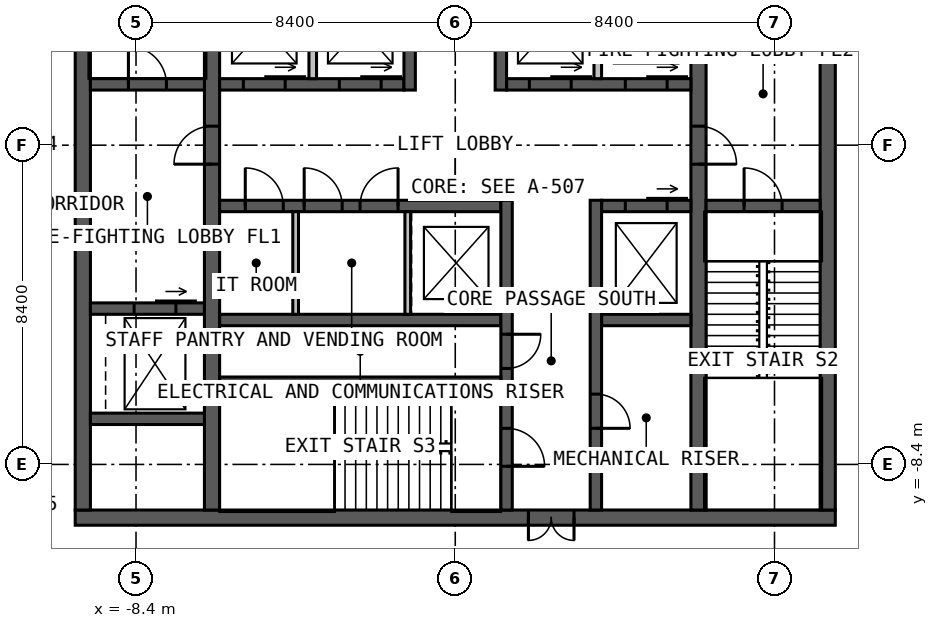
"""IFC4 building model, lengths in metres.
Left out: names, types, materials, properties, quantities, classifications, styles, units other than length and angle.
Written with IfcOpenShell. Run it as: python <this file> out.ifc"""

import sys

from ifc_helpers import new_model, si_unit, direction, frame, frame_2d, origin, place, context, subcontext, project, spatial, rectangle, extrude, element, fill, save


model = new_model("IFC4")
c1 = context("Model", 3, precision=1e-05, world=origin(), true_north=direction((0.0, 1.0)))
c2 = subcontext(c1, "Body", "Model", "MODEL_VIEW")
j1 = project(units=[si_unit("LENGTHUNIT", "METRE"), si_unit("PLANEANGLEUNIT", "RADIAN")], contexts=[c1])
p1 = place(None, origin())
s1 = spatial("IfcSite", under=j1, at=p1, CompositionType="ELEMENT")
p2 = place(p1, origin())
s2 = spatial("IfcBuilding", under=s1, at=p2, CompositionType="ELEMENT")
p3 = place(p2, frame((0.0, 0.0, 252.0)))
s3 = spatial("IfcBuildingStorey", under=s2, at=p3, CompositionType="ELEMENT", Elevation=252.0)
p4 = place(p3, frame((10.0, -9.8, 0.0), z_axis=(0.0, 0.0, 1.0), x_axis=(-1.0, 0.0, 0.0)))
e1 = element("IfcWall", 1, at=p4, inside=s3, PredefinedType="SOLIDWALL", context=c2, shape_type="SweptSolid", body=[
    extrude(rectangle(XDim=20.0, YDim=0.4, at=frame_2d((10.0, 0.0))), origin(), (0.0, 0.0, 1.0), 4.0),
])
p5 = place(p4, frame((6.875, 0.0, 0.0)))
e2 = element("IfcOpeningElement", 2, at=p5, cuts=e1, PredefinedType="OPENING", context=c2, shape_type="SweptSolid", body=[
    extrude(rectangle(XDim=1.2, YDim=2.2, at=frame_2d((0.6, 1.1))), frame((0.0, 0.21, 0.0), z_axis=(0.0, -1.0, 0.0), x_axis=(1.0, 0.0, 0.0)), (0.0, 0.0, 1.0), 0.42),
])
for number, where, z_axis, x_axis in (
    (3, (9.8, -9.6, 0.0), (0.0, 0.0, 1.0), (0.0, 1.0, 0.0)),
    (4, (-9.8, 9.6, 0.0), (0.0, 0.0, 1.0), (0.0, -1.0, 0.0)),
):
    element("IfcWall", number, at=place(p3, frame(where, z_axis=z_axis, x_axis=x_axis)), inside=s3, PredefinedType="SOLIDWALL", context=c2, shape_type="SweptSolid", body=[
        extrude(rectangle(XDim=19.2, YDim=0.4, at=frame_2d((9.6, 0.0))), origin(), (0.0, 0.0, 1.0), 4.0),
    ])
p6 = place(p3, frame((-6.4, -9.6, 0.0), z_axis=(0.0, 0.0, 1.0), x_axis=(0.0, 1.0, 0.0)))
e5 = element("IfcWall", 5, at=p6, inside=s3, PredefinedType="SOLIDWALL", context=c2, shape_type="SweptSolid", body=[
    extrude(rectangle(XDim=19.2, YDim=0.4, at=frame_2d((9.6, 0.0))), origin(), (0.0, 0.0, 1.0), 4.0),
])
p7 = place(p6, frame((9.1, 0.0, 0.0)))
e6 = element("IfcOpeningElement", 6, at=p7, cuts=e5, PredefinedType="OPENING", context=c2, shape_type="SweptSolid", body=[
    extrude(rectangle(XDim=1.0, YDim=2.2, at=frame_2d((0.5, 1.1))), frame((0.0, 0.21, 0.0), z_axis=(0.0, -1.0, 0.0), x_axis=(1.0, 0.0, 0.0)), (0.0, 0.0, 1.0), 0.42),
])
p8 = place(p3, frame((6.4, 9.6, 0.0), z_axis=(0.0, 0.0, 1.0), x_axis=(0.0, -1.0, 0.0)))
e7 = element("IfcWall", 7, at=p8, inside=s3, PredefinedType="SOLIDWALL", context=c2, shape_type="SweptSolid", body=[
    extrude(rectangle(XDim=19.2, YDim=0.4, at=frame_2d((9.6, 0.0))), origin(), (0.0, 0.0, 1.0), 4.0),
])
p9 = place(p8, frame((9.1, 0.0, 0.0)))
e8 = element("IfcOpeningElement", 8, at=p9, cuts=e7, PredefinedType="OPENING", context=c2, shape_type="SweptSolid", body=[
    extrude(rectangle(XDim=1.0, YDim=2.2, at=frame_2d((0.5, 1.1))), frame((0.0, 0.21, 0.0), z_axis=(0.0, -1.0, 0.0), x_axis=(1.0, 0.0, 0.0)), (0.0, 0.0, 1.0), 0.42),
])
p10 = place(p3, frame((-6.2, 1.6, 0.0), z_axis=(0.0, 0.0, 1.0), x_axis=(1.0, 0.0, 0.0)))
e9 = element("IfcWall", 9, at=p10, inside=s3, PredefinedType="SOLIDWALL", context=c2, shape_type="SweptSolid", body=[
    extrude(rectangle(XDim=4.85, YDim=0.3, at=frame_2d((2.425, 0.0))), origin(), (0.0, 0.0, 1.0), 4.0),
])
p11 = place(p10, frame((0.625, 0.0, 0.0)))
e10 = element("IfcOpeningElement", 10, at=p11, cuts=e9, PredefinedType="OPENING", context=c2, shape_type="SweptSolid", body=[
    extrude(rectangle(XDim=1.1, YDim=2.2, at=frame_2d((0.55, 1.1))), frame((0.0, 0.16, 0.0), z_axis=(0.0, -1.0, 0.0), x_axis=(1.0, 0.0, 0.0)), (0.0, 0.0, 1.0), 0.32),
])
p12 = place(p10, frame((3.15, 0.0, 0.0)))
e11 = element("IfcOpeningElement", 11, at=p12, cuts=e9, PredefinedType="OPENING", context=c2, shape_type="SweptSolid", body=[
    extrude(rectangle(XDim=1.1, YDim=2.2, at=frame_2d((0.55, 1.1))), frame((0.0, 0.16, 0.0), z_axis=(0.0, -1.0, 0.0), x_axis=(1.0, 0.0, 0.0)), (0.0, 0.0, 1.0), 0.32),
])
p13 = place(p3, frame((1.35, 1.6, 0.0), z_axis=(0.0, 0.0, 1.0), x_axis=(1.0, 0.0, 0.0)))
e12 = element("IfcWall", 12, at=p13, inside=s3, PredefinedType="SOLIDWALL", context=c2, shape_type="SweptSolid", body=[
    extrude(rectangle(XDim=4.85, YDim=0.3, at=frame_2d((2.425, 0.0))), origin(), (0.0, 0.0, 1.0), 4.0),
])
p14 = place(p13, frame((0.6, 0.0, 0.0)))
e13 = element("IfcOpeningElement", 13, at=p14, cuts=e12, PredefinedType="OPENING", context=c2, shape_type="SweptSolid", body=[
    extrude(rectangle(XDim=1.1, YDim=2.2, at=frame_2d((0.55, 1.1))), frame((0.0, 0.16, 0.0), z_axis=(0.0, -1.0, 0.0), x_axis=(1.0, 0.0, 0.0)), (0.0, 0.0, 1.0), 0.32),
])
p15 = place(p13, frame((3.125, 0.0, 0.0)))
e14 = element("IfcOpeningElement", 14, at=p15, cuts=e12, PredefinedType="OPENING", context=c2, shape_type="SweptSolid", body=[
    extrude(rectangle(XDim=1.1, YDim=2.2, at=frame_2d((0.55, 1.1))), frame((0.0, 0.16, 0.0), z_axis=(0.0, -1.0, 0.0), x_axis=(1.0, 0.0, 0.0)), (0.0, 0.0, 1.0), 0.32),
])
p16 = place(p3, frame((-1.2, 1.45, 0.0), z_axis=(0.0, 0.0, 1.0), x_axis=(0.0, 1.0, 0.0)))
e15 = element("IfcWall", 15, at=p16, inside=s3, PredefinedType="SOLIDWALL", context=c2, shape_type="SweptSolid", body=[
    extrude(rectangle(XDim=8.15, YDim=0.3, at=frame_2d((4.075, 0.0))), origin(), (0.0, 0.0, 1.0), 4.0),
])
p17 = place(p16, frame((5.05, 0.0, 0.0)))
e16 = element("IfcOpeningElement", 16, at=p17, cuts=e15, PredefinedType="OPENING", context=c2, shape_type="SweptSolid", body=[
    extrude(rectangle(XDim=1.0, YDim=2.2, at=frame_2d((0.5, 1.1))), frame((0.0, 0.16, 0.0), z_axis=(0.0, -1.0, 0.0), x_axis=(1.0, 0.0, 0.0)), (0.0, 0.0, 1.0), 0.32),
])
p18 = place(p3, frame((1.2, 1.45, 0.0), z_axis=(0.0, 0.0, 1.0), x_axis=(0.0, 1.0, 0.0)))
e17 = element("IfcWall", 17, at=p18, inside=s3, PredefinedType="SOLIDWALL", context=c2, shape_type="SweptSolid", body=[
    extrude(rectangle(XDim=8.15, YDim=0.3, at=frame_2d((4.075, 0.0))), origin(), (0.0, 0.0, 1.0), 4.0),
])
p19 = place(p18, frame((3.8, 0.0, 0.0)))
e18 = element("IfcOpeningElement", 18, at=p19, cuts=e17, PredefinedType="OPENING", context=c2, shape_type="SweptSolid", body=[
    extrude(rectangle(XDim=1.0, YDim=2.2, at=frame_2d((0.5, 1.1))), frame((0.0, 0.16, 0.0), z_axis=(0.0, -1.0, 0.0), x_axis=(1.0, 0.0, 0.0)), (0.0, 0.0, 1.0), 0.32),
])
p20 = place(p18, frame((6.15, 0.0, 0.0)))
e19 = element("IfcOpeningElement", 19, at=p20, cuts=e17, PredefinedType="OPENING", context=c2, shape_type="SweptSolid", body=[
    extrude(rectangle(XDim=1.0, YDim=2.2, at=frame_2d((0.5, 1.1))), frame((0.0, 0.16, 0.0), z_axis=(0.0, -1.0, 0.0), x_axis=(1.0, 0.0, 0.0)), (0.0, 0.0, 1.0), 0.32),
])
p21 = place(p3, frame((-6.2, -1.6, 0.0), z_axis=(0.0, 0.0, 1.0), x_axis=(1.0, 0.0, 0.0)))
e20 = element("IfcWall", 20, at=p21, inside=s3, PredefinedType="SOLIDWALL", context=c2, shape_type="SweptSolid", body=[
    extrude(rectangle(XDim=7.4, YDim=0.3, at=frame_2d((3.7, 0.0))), origin(), (0.0, 0.0, 1.0), 4.0),
])
p22 = place(p21, frame((0.675, 0.0, 0.0)))
e21 = element("IfcOpeningElement", 21, at=p22, cuts=e20, PredefinedType="OPENING", context=c2, shape_type="SweptSolid", body=[
    extrude(rectangle(XDim=1.0, YDim=2.2, at=frame_2d((0.5, 1.1))), frame((0.0, 0.16, 0.0), z_axis=(0.0, -1.0, 0.0), x_axis=(1.0, 0.0, 0.0)), (0.0, 0.0, 1.0), 0.32),
])
p23 = place(p21, frame((2.225, 0.0, 0.0)))
e22 = element("IfcOpeningElement", 22, at=p23, cuts=e20, PredefinedType="OPENING", context=c2, shape_type="SweptSolid", body=[
    extrude(rectangle(XDim=1.0, YDim=2.2, at=frame_2d((0.5, 1.1))), frame((0.0, 0.16, 0.0), z_axis=(0.0, -1.0, 0.0), x_axis=(1.0, 0.0, 0.0)), (0.0, 0.0, 1.0), 0.32),
])
p24 = place(p21, frame((3.695, 0.0, 0.0)))
e23 = element("IfcOpeningElement", 23, at=p24, cuts=e20, PredefinedType="OPENING", context=c2, shape_type="SweptSolid", body=[
    extrude(rectangle(XDim=1.0, YDim=2.2, at=frame_2d((0.5, 1.1))), frame((0.0, 0.16, 0.0), z_axis=(0.0, -1.0, 0.0), x_axis=(1.0, 0.0, 0.0)), (0.0, 0.0, 1.0), 0.32),
])
p25 = place(p3, frame((3.85, -1.6, 0.0), z_axis=(0.0, 0.0, 1.0), x_axis=(1.0, 0.0, 0.0)))
e24 = element("IfcWall", 24, at=p25, inside=s3, PredefinedType="SOLIDWALL", context=c2, shape_type="SweptSolid", body=[
    extrude(rectangle(XDim=2.35, YDim=0.3, at=frame_2d((1.175, 0.0))), origin(), (0.0, 0.0, 1.0), 4.0),
])
p26 = place(p25, frame((0.625, 0.0, 0.0)))
e25 = element("IfcOpeningElement", 25, at=p26, cuts=e24, PredefinedType="OPENING", context=c2, shape_type="SweptSolid", body=[
    extrude(rectangle(XDim=1.1, YDim=2.2, at=frame_2d((0.55, 1.1))), frame((0.0, 0.16, 0.0), z_axis=(0.0, -1.0, 0.0), x_axis=(1.0, 0.0, 0.0)), (0.0, 0.0, 1.0), 0.32),
])
p27 = place(p3, frame((-6.2, -4.6, 0.0), z_axis=(0.0, 0.0, 1.0), x_axis=(1.0, 0.0, 0.0)))
e26 = element("IfcWall", 26, at=p27, inside=s3, PredefinedType="SOLIDWALL", context=c2, shape_type="SweptSolid", body=[
    extrude(rectangle(XDim=7.4, YDim=0.3, at=frame_2d((3.7, 0.0))), origin(), (0.0, 0.0, 1.0), 4.0),
])
p28 = place(p3, frame((3.85, -4.6, 0.0), z_axis=(0.0, 0.0, 1.0), x_axis=(1.0, 0.0, 0.0)))
e27 = element("IfcWall", 27, at=p28, inside=s3, PredefinedType="SOLIDWALL", context=c2, shape_type="SweptSolid", body=[
    extrude(rectangle(XDim=2.35, YDim=0.3, at=frame_2d((1.175, 0.0))), origin(), (0.0, 0.0, 1.0), 4.0),
])
p29 = place(p3, frame((1.35, -1.45, 0.0), z_axis=(0.0, 0.0, 1.0), x_axis=(0.0, -1.0, 0.0)))
e28 = element("IfcWall", 28, at=p29, inside=s3, PredefinedType="SOLIDWALL", context=c2, shape_type="SweptSolid", body=[
    extrude(rectangle(XDim=8.15, YDim=0.3, at=frame_2d((4.075, 0.0))), origin(), (0.0, 0.0, 1.0), 4.0),
])
p30 = place(p29, frame((6.0, 0.0, 0.0)))
e29 = element("IfcOpeningElement", 29, at=p30, cuts=e28, PredefinedType="OPENING", context=c2, shape_type="SweptSolid", body=[
    extrude(rectangle(XDim=1.0, YDim=2.2, at=frame_2d((0.5, 1.1))), frame((0.0, 0.16, 0.0), z_axis=(0.0, -1.0, 0.0), x_axis=(1.0, 0.0, 0.0)), (0.0, 0.0, 1.0), 0.32),
])
p31 = place(p29, frame((3.525, 0.0, 0.0)))
e30 = element("IfcOpeningElement", 30, at=p31, cuts=e28, PredefinedType="OPENING", context=c2, shape_type="SweptSolid", body=[
    extrude(rectangle(XDim=0.9, YDim=2.2, at=frame_2d((0.45, 1.1))), frame((0.0, 0.16, 0.0), z_axis=(0.0, -1.0, 0.0), x_axis=(1.0, 0.0, 0.0)), (0.0, 0.0, 1.0), 0.32),
])
p32 = place(p3, frame((3.7, -1.45, 0.0), z_axis=(0.0, 0.0, 1.0), x_axis=(0.0, -1.0, 0.0)))
e31 = element("IfcWall", 31, at=p32, inside=s3, PredefinedType="SOLIDWALL", context=c2, shape_type="SweptSolid", body=[
    extrude(rectangle(XDim=8.15, YDim=0.3, at=frame_2d((4.075, 0.0))), origin(), (0.0, 0.0, 1.0), 4.0),
])
p33 = place(p32, frame((5.1, 0.0, 0.0)))
e32 = element("IfcOpeningElement", 32, at=p33, cuts=e31, PredefinedType="OPENING", context=c2, shape_type="SweptSolid", body=[
    extrude(rectangle(XDim=0.9, YDim=2.2, at=frame_2d((0.45, 1.1))), frame((0.0, 0.16, 0.0), z_axis=(0.0, -1.0, 0.0), x_axis=(1.0, 0.0, 0.0)), (0.0, 0.0, 1.0), 0.32),
])
p34 = place(p3, frame((-6.2, -6.2, 0.0), z_axis=(0.0, 0.0, 1.0), x_axis=(1.0, 0.0, 0.0)))
e33 = element("IfcWall", 33, at=p34, inside=s3, PredefinedType="SOLIDWALL", context=c2, shape_type="SweptSolid", body=[
    extrude(rectangle(XDim=7.4, YDim=0.2, at=frame_2d((3.7, 0.0))), origin(), (0.0, 0.0, 1.0), 4.0),
])
p35 = place(p3, frame((-9.6, 1.6, 0.0), z_axis=(0.0, 0.0, 1.0), x_axis=(1.0, 0.0, 0.0)))
e34 = element("IfcWall", 34, at=p35, inside=s3, PredefinedType="SOLIDWALL", context=c2, shape_type="SweptSolid", body=[
    extrude(rectangle(XDim=3.0, YDim=0.3, at=frame_2d((1.5, 0.0))), origin(), (0.0, 0.0, 1.0), 4.0),
])
p36 = place(p35, frame((1.0, 0.0, 0.0)))
e35 = element("IfcOpeningElement", 35, at=p36, cuts=e34, PredefinedType="OPENING", context=c2, shape_type="SweptSolid", body=[
    extrude(rectangle(XDim=1.0, YDim=2.2, at=frame_2d((0.5, 1.1))), frame((0.0, 0.16, 0.0), z_axis=(0.0, -1.0, 0.0), x_axis=(1.0, 0.0, 0.0)), (0.0, 0.0, 1.0), 0.32),
])
p37 = place(p3, frame((6.6, -1.6, 0.0), z_axis=(0.0, 0.0, 1.0), x_axis=(1.0, 0.0, 0.0)))
e36 = element("IfcWall", 36, at=p37, inside=s3, PredefinedType="SOLIDWALL", context=c2, shape_type="SweptSolid", body=[
    extrude(rectangle(XDim=3.0, YDim=0.3, at=frame_2d((1.5, 0.0))), origin(), (0.0, 0.0, 1.0), 4.0),
])
p38 = place(p37, frame((1.0, 0.0, 0.0)))
e37 = element("IfcOpeningElement", 37, at=p38, cuts=e36, PredefinedType="OPENING", context=c2, shape_type="SweptSolid", body=[
    extrude(rectangle(XDim=1.0, YDim=2.2, at=frame_2d((0.5, 1.1))), frame((0.0, 0.16, 0.0), z_axis=(0.0, -1.0, 0.0), x_axis=(1.0, 0.0, 0.0)), (0.0, 0.0, 1.0), 0.32),
])
p39 = place(p3, frame((-9.6, -4.3, 0.0), z_axis=(0.0, 0.0, 1.0), x_axis=(1.0, 0.0, 0.0)))
e38 = element("IfcWall", 38, at=p39, inside=s3, PredefinedType="SOLIDWALL", context=c2, shape_type="SweptSolid", body=[
    extrude(rectangle(XDim=3.0, YDim=0.3, at=frame_2d((1.5, 0.0))), origin(), (0.0, 0.0, 1.0), 4.0),
])
p40 = place(p39, frame((1.15, 0.0, 0.0)))
e39 = element("IfcOpeningElement", 39, at=p40, cuts=e38, PredefinedType="OPENING", context=c2, shape_type="SweptSolid", body=[
    extrude(rectangle(XDim=1.1, YDim=2.2, at=frame_2d((0.55, 1.1))), frame((0.0, 0.16, 0.0), z_axis=(0.0, -1.0, 0.0), x_axis=(1.0, 0.0, 0.0)), (0.0, 0.0, 1.0), 0.32),
])
p41 = place(p3, frame((-9.6, -7.2, 0.0), z_axis=(0.0, 0.0, 1.0), x_axis=(1.0, 0.0, 0.0)))
e40 = element("IfcWall", 40, at=p41, inside=s3, PredefinedType="SOLIDWALL", context=c2, shape_type="SweptSolid", body=[
    extrude(rectangle(XDim=3.0, YDim=0.3, at=frame_2d((1.5, 0.0))), origin(), (0.0, 0.0, 1.0), 4.0),
])
for number, where, z_axis, x_axis in (
    (41, (-3.75, 1.75, 0.0), (0.0, 0.0, 1.0), (0.0, 1.0, 0.0)),
    (42, (3.75, 1.75, 0.0), (0.0, 0.0, 1.0), (0.0, 1.0, 0.0)),
):
    element("IfcWall", number, at=place(p3, frame(where, z_axis=z_axis, x_axis=x_axis)), inside=s3, PredefinedType="SOLIDWALL", context=c2, shape_type="SweptSolid", body=[
        extrude(rectangle(XDim=2.7, YDim=0.2, at=frame_2d((1.35, 0.0))), origin(), (0.0, 0.0, 1.0), 3.75),
    ])
for number, where, z_axis, x_axis in (
    (43, (-4.2, -1.75, 0.0), (0.0, 0.0, 1.0), (0.0, -1.0, 0.0)),
    (44, (-1.25, -1.75, 0.0), (0.0, 0.0, 1.0), (0.0, -1.0, 0.0)),
):
    element("IfcWall", number, at=place(p3, frame(where, z_axis=z_axis, x_axis=x_axis)), inside=s3, PredefinedType="PARTITIONING", context=c2, shape_type="SweptSolid", body=[
        extrude(rectangle(XDim=2.7, YDim=0.15, at=frame_2d((1.35, 0.0))), origin(), (0.0, 0.0, 1.0), 3.75),
    ])
p42 = place(p5, origin())
e45 = element("IfcDoor", 45, at=p42, inside=s3, OperationType="DOUBLE_DOOR_SINGLE_SWING", PredefinedType="DOOR", context=c2, shape_type="SweptSolid", body=[
    extrude(rectangle(XDim=1.2, YDim=2.2, at=frame_2d((0.6, 1.1))), frame((0.0, 0.025, 0.0), z_axis=(0.0, -1.0, 0.0), x_axis=(1.0, 0.0, 0.0)), (0.0, 0.0, 1.0), 0.05),
])
fill(e2, e45)
p43 = place(p7, origin())
e46 = element("IfcDoor", 46, at=p43, inside=s3, OperationType="SINGLE_SWING_LEFT", PredefinedType="DOOR", context=c2, shape_type="SweptSolid", body=[
    extrude(rectangle(XDim=1.0, YDim=2.2, at=frame_2d((0.5, 1.1))), frame((0.0, 0.025, 0.0), z_axis=(0.0, -1.0, 0.0), x_axis=(1.0, 0.0, 0.0)), (0.0, 0.0, 1.0), 0.05),
])
fill(e6, e46)
p44 = place(p9, origin())
e47 = element("IfcDoor", 47, at=p44, inside=s3, OperationType="SINGLE_SWING_RIGHT", PredefinedType="DOOR", context=c2, shape_type="SweptSolid", body=[
    extrude(rectangle(XDim=1.0, YDim=2.2, at=frame_2d((0.5, 1.1))), frame((0.0, 0.025, 0.0), z_axis=(0.0, -1.0, 0.0), x_axis=(1.0, 0.0, 0.0)), (0.0, 0.0, 1.0), 0.05),
])
fill(e8, e47)
p45 = place(p36, origin())
e48 = element("IfcDoor", 48, at=p45, inside=s3, OperationType="SINGLE_SWING_LEFT", PredefinedType="DOOR", context=c2, shape_type="SweptSolid", body=[
    extrude(rectangle(XDim=1.0, YDim=2.2, at=frame_2d((0.5, 1.1))), frame((0.0, 0.025, 0.0), z_axis=(0.0, -1.0, 0.0), x_axis=(1.0, 0.0, 0.0)), (0.0, 0.0, 1.0), 0.05),
])
fill(e35, e48)
p46 = place(p38, origin())
e49 = element("IfcDoor", 49, at=p46, inside=s3, OperationType="SINGLE_SWING_LEFT", PredefinedType="DOOR", context=c2, shape_type="SweptSolid", body=[
    extrude(rectangle(XDim=1.0, YDim=2.2, at=frame_2d((0.5, 1.1))), frame((0.0, 0.025, 0.0), z_axis=(0.0, -1.0, 0.0), x_axis=(1.0, 0.0, 0.0)), (0.0, 0.0, 1.0), 0.05),
])
fill(e37, e49)
p47 = place(p30, origin())
e50 = element("IfcDoor", 50, at=p47, inside=s3, OperationType="SINGLE_SWING_RIGHT", PredefinedType="DOOR", context=c2, shape_type="SweptSolid", body=[
    extrude(rectangle(XDim=1.0, YDim=2.2, at=frame_2d((0.5, 1.1))), frame((0.0, 0.025, 0.0), z_axis=(0.0, -1.0, 0.0), x_axis=(1.0, 0.0, 0.0)), (0.0, 0.0, 1.0), 0.05),
])
fill(e29, e50)
p48 = place(p31, origin())
e51 = element("IfcDoor", 51, at=p48, inside=s3, OperationType="SINGLE_SWING_LEFT", PredefinedType="DOOR", context=c2, shape_type="SweptSolid", body=[
    extrude(rectangle(XDim=0.9, YDim=2.2, at=frame_2d((0.45, 1.1))), frame((0.0, 0.025, 0.0), z_axis=(0.0, -1.0, 0.0), x_axis=(1.0, 0.0, 0.0)), (0.0, 0.0, 1.0), 0.05),
])
fill(e30, e51)
p49 = place(p33, origin())
e52 = element("IfcDoor", 52, at=p49, inside=s3, OperationType="SINGLE_SWING_RIGHT", PredefinedType="DOOR", context=c2, shape_type="SweptSolid", body=[
    extrude(rectangle(XDim=0.9, YDim=2.2, at=frame_2d((0.45, 1.1))), frame((0.0, 0.025, 0.0), z_axis=(0.0, -1.0, 0.0), x_axis=(1.0, 0.0, 0.0)), (0.0, 0.0, 1.0), 0.05),
])
fill(e32, e52)
p50 = place(p22, origin())
e53 = element("IfcDoor", 53, at=p50, inside=s3, OperationType="SINGLE_SWING_LEFT", PredefinedType="DOOR", context=c2, shape_type="SweptSolid", body=[
    extrude(rectangle(XDim=1.0, YDim=2.2, at=frame_2d((0.5, 1.1))), frame((0.0, 0.025, 0.0), z_axis=(0.0, -1.0, 0.0), x_axis=(1.0, 0.0, 0.0)), (0.0, 0.0, 1.0), 0.05),
])
fill(e21, e53)
p51 = place(p23, origin())
e54 = element("IfcDoor", 54, at=p51, inside=s3, OperationType="SINGLE_SWING_LEFT", PredefinedType="DOOR", context=c2, shape_type="SweptSolid", body=[
    extrude(rectangle(XDim=1.0, YDim=2.2, at=frame_2d((0.5, 1.1))), frame((0.0, 0.025, 0.0), z_axis=(0.0, -1.0, 0.0), x_axis=(1.0, 0.0, 0.0)), (0.0, 0.0, 1.0), 0.05),
])
fill(e22, e54)
p52 = place(p24, origin())
e55 = element("IfcDoor", 55, at=p52, inside=s3, OperationType="SINGLE_SWING_RIGHT", PredefinedType="DOOR", context=c2, shape_type="SweptSolid", body=[
    extrude(rectangle(XDim=1.0, YDim=2.2, at=frame_2d((0.5, 1.1))), frame((0.0, 0.025, 0.0), z_axis=(0.0, -1.0, 0.0), x_axis=(1.0, 0.0, 0.0)), (0.0, 0.0, 1.0), 0.05),
])
fill(e23, e55)
p53 = place(p11, origin())
e56 = element("IfcDoor", 56, at=p53, inside=s3, OperationType="SLIDING_TO_LEFT", PredefinedType="DOOR", context=c2, shape_type="SweptSolid", body=[
    extrude(rectangle(XDim=1.1, YDim=2.2, at=frame_2d((0.55, 1.1))), frame((0.0, 0.025, 0.0), z_axis=(0.0, -1.0, 0.0), x_axis=(1.0, 0.0, 0.0)), (0.0, 0.0, 1.0), 0.05),
])
fill(e10, e56)
p54 = place(p12, origin())
e57 = element("IfcDoor", 57, at=p54, inside=s3, OperationType="SLIDING_TO_LEFT", PredefinedType="DOOR", context=c2, shape_type="SweptSolid", body=[
    extrude(rectangle(XDim=1.1, YDim=2.2, at=frame_2d((0.55, 1.1))), frame((0.0, 0.025, 0.0), z_axis=(0.0, -1.0, 0.0), x_axis=(1.0, 0.0, 0.0)), (0.0, 0.0, 1.0), 0.05),
])
fill(e11, e57)
p55 = place(p14, origin())
e58 = element("IfcDoor", 58, at=p55, inside=s3, OperationType="SLIDING_TO_LEFT", PredefinedType="DOOR", context=c2, shape_type="SweptSolid", body=[
    extrude(rectangle(XDim=1.1, YDim=2.2, at=frame_2d((0.55, 1.1))), frame((0.0, 0.025, 0.0), z_axis=(0.0, -1.0, 0.0), x_axis=(1.0, 0.0, 0.0)), (0.0, 0.0, 1.0), 0.05),
])
fill(e13, e58)
p56 = place(p15, origin())
e59 = element("IfcDoor", 59, at=p56, inside=s3, OperationType="SLIDING_TO_LEFT", PredefinedType="DOOR", context=c2, shape_type="SweptSolid", body=[
    extrude(rectangle(XDim=1.1, YDim=2.2, at=frame_2d((0.55, 1.1))), frame((0.0, 0.025, 0.0), z_axis=(0.0, -1.0, 0.0), x_axis=(1.0, 0.0, 0.0)), (0.0, 0.0, 1.0), 0.05),
])
fill(e14, e59)
p57 = place(p26, origin())
e60 = element("IfcDoor", 60, at=p57, inside=s3, OperationType="SLIDING_TO_LEFT", PredefinedType="DOOR", context=c2, shape_type="SweptSolid", body=[
    extrude(rectangle(XDim=1.1, YDim=2.2, at=frame_2d((0.55, 1.1))), frame((0.0, 0.025, 0.0), z_axis=(0.0, -1.0, 0.0), x_axis=(1.0, 0.0, 0.0)), (0.0, 0.0, 1.0), 0.05),
])
fill(e25, e60)
p58 = place(p40, origin())
e61 = element("IfcDoor", 61, at=p58, inside=s3, OperationType="SLIDING_TO_LEFT", PredefinedType="DOOR", context=c2, shape_type="SweptSolid", body=[
    extrude(rectangle(XDim=1.1, YDim=2.2, at=frame_2d((0.55, 1.1))), frame((0.0, 0.025, 0.0), z_axis=(0.0, -1.0, 0.0), x_axis=(1.0, 0.0, 0.0)), (0.0, 0.0, 1.0), 0.05),
])
fill(e39, e61)
save(model, sys.argv[1])
